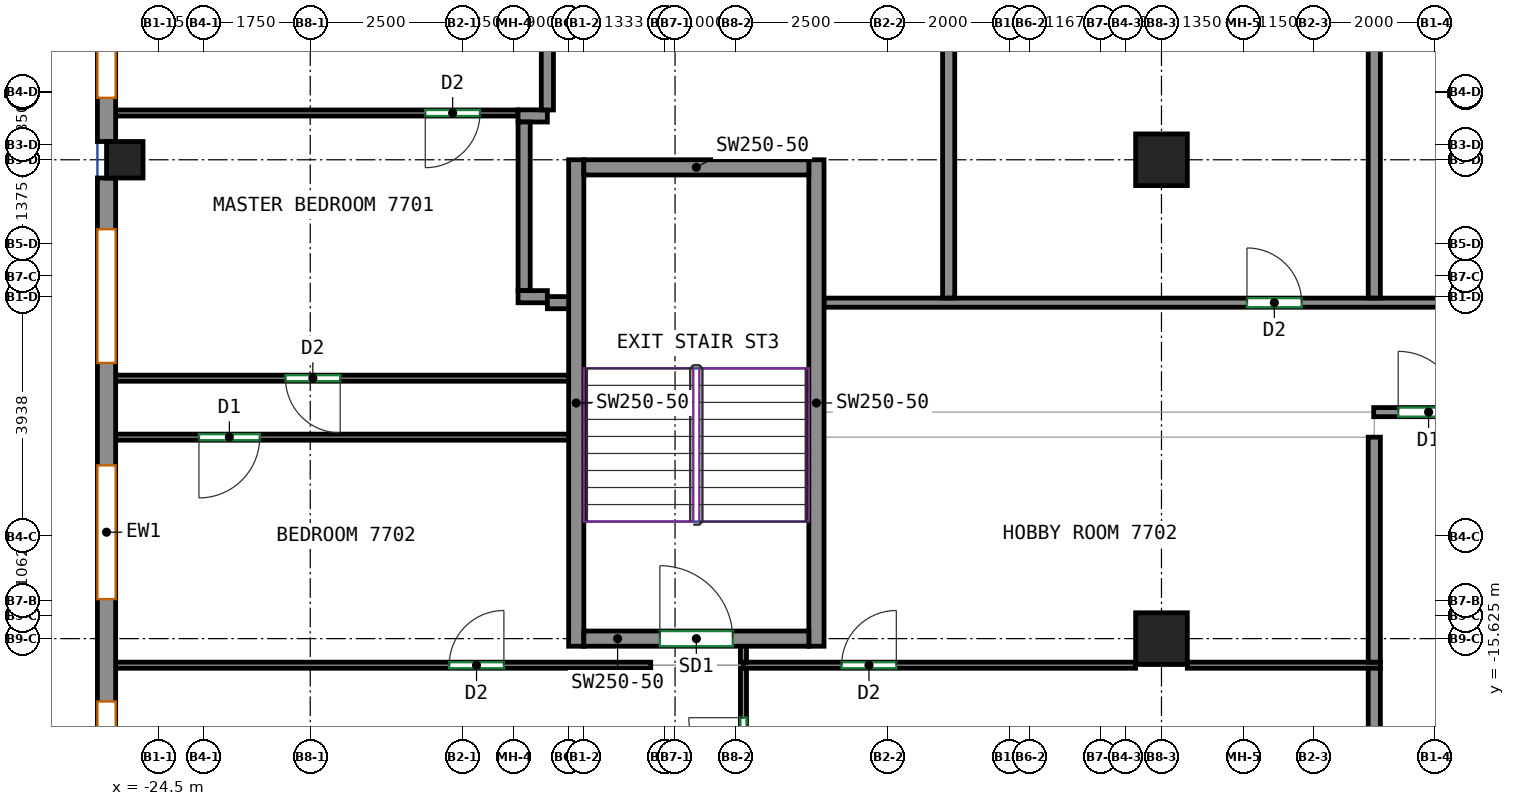
"""IFC4 building model, lengths in metres.
Left out: names, types, materials, properties, quantities, classifications, styles, units other than length and angle.
Written with IfcOpenShell. Run it as: python <this file> out.ifc"""

import sys

from ifc_helpers import new_model, si_unit, direction, frame, frame_2d, origin, origin_2d, place, context, subcontext, project, spatial, rectangle, extrude, source, transform, mapped, element, fill, save


model = new_model("IFC4")
c1 = context("Model", 3, precision=1e-05, world=origin(), true_north=direction((0.0, 1.0)))
c2 = subcontext(c1, "Body", "Model", "MODEL_VIEW")
j1 = project(units=[si_unit("LENGTHUNIT", "METRE"), si_unit("PLANEANGLEUNIT", "RADIAN")], contexts=[c1])
p1 = place(None, origin())
s1 = spatial("IfcSite", under=j1, at=p1, CompositionType="ELEMENT")
p2 = place(p1, origin())
s2 = spatial("IfcBuilding", under=s1, at=p2, CompositionType="ELEMENT")
p3 = place(p2, frame((0.0, 0.0, 308.6)))
s3 = spatial("IfcBuildingStorey", under=s2, at=p3, CompositionType="ELEMENT", Elevation=308.6)
m1 = source(origin(), c2, "Body", "SweptSolid", [
    extrude(rectangle(XDim=0.6, YDim=0.6, at=origin_2d()), origin(), (0.0, 0.0, 1.0), 3.12),
])
p4 = place(p3, frame((-25.05, -7.75, 0.0), z_axis=(0.0, 0.0, 1.0), x_axis=(1.0, 0.0, 0.0)))
e1 = element("IfcColumn", 1, at=p4, inside=s3, PredefinedType="COLUMN", context=c2, shape_type="MappedRepresentation", body=[
    mapped(m1, transform((0.0, 0.0, 0.0))),
])
m2 = source(origin(), c2, "Body", "SweptSolid", [
    extrude(rectangle(XDim=0.85, YDim=0.85, at=origin_2d()), origin(), (0.0, 0.0, 1.0), 3.12),
])
for number, where, z_axis, x_axis in (
    (2, (-8.0, -15.625, 0.0), (0.0, 0.0, 1.0), (1.0, 0.0, 0.0)),
    (3, (-8.0, -7.75, 0.0), (0.0, 0.0, 1.0), (1.0, 0.0, 0.0)),
):
    element("IfcColumn", number, at=place(p3, frame(where, z_axis=z_axis, x_axis=x_axis)), inside=s3, PredefinedType="COLUMN", context=c2, shape_type="MappedRepresentation", body=[
        mapped(m2, transform((0.0, 0.0, 0.0))),
    ])
m3 = source(origin(), c2, "Body", "SweptSolid", [
    extrude(rectangle(XDim=8.0, YDim=0.25, at=frame_2d((4.0, 0.0))), origin(), (0.0, 0.0, 1.0), 3.12),
])
for number, where, z_axis, x_axis in (
    (4, (-17.625, -15.75, 0.0), (0.0, 0.0, 1.0), (0.0, 1.0, 0.0)),
    (5, (-13.675, -15.75, 0.0), (0.0, 0.0, 1.0), (0.0, 1.0, 0.0)),
):
    element("IfcWall", number, at=place(p3, frame(where, z_axis=z_axis, x_axis=x_axis)), inside=s3, PredefinedType="SHEAR", context=c2, shape_type="MappedRepresentation", body=[
        mapped(m3, transform((0.0, 0.0, 0.0))),
    ])
m4 = source(origin(), c2, "Body", "SweptSolid", [
    extrude(rectangle(XDim=3.7, YDim=0.25, at=frame_2d((1.85, 0.0))), origin(), (0.0, 0.0, 1.0), 3.12),
])
p5 = place(p3, frame((-17.5, -15.625, 0.0), z_axis=(0.0, 0.0, 1.0), x_axis=(1.0, 0.0, 0.0)))
e6 = element("IfcWall", 6, at=p5, inside=s3, PredefinedType="SHEAR", context=c2, shape_type="MappedRepresentation", body=[
    mapped(m4, transform((0.0, 0.0, 0.0))),
])
p6 = place(p5, frame((1.25, 0.0, 0.0)))
e7 = element("IfcOpeningElement", 7, at=p6, cuts=e6, PredefinedType="OPENING", context=c2, shape_type="SweptSolid", body=[
    extrude(rectangle(XDim=1.2, YDim=2.1, at=frame_2d((0.6, 1.05))), frame((0.0, 0.135, 0.0), z_axis=(0.0, -1.0, 0.0), x_axis=(1.0, 0.0, 0.0)), (0.0, 0.0, 1.0), 0.27),
])
p7 = place(p3, frame((-17.5, -7.875, 0.0), z_axis=(0.0, 0.0, 1.0), x_axis=(1.0, 0.0, 0.0)))
e8 = element("IfcWall", 8, at=p7, inside=s3, PredefinedType="SHEAR", context=c2, shape_type="MappedRepresentation", body=[
    mapped(m4, transform((0.0, 0.0, 0.0))),
])
m5 = source(origin(), c2, "Body", "SweptSolid", [
    extrude(rectangle(XDim=7.275, YDim=0.3, at=frame_2d((3.637, 0.0))), origin(), (0.0, 0.0, 1.0), 3.12),
])
p8 = place(p3, frame((-25.35, -0.175, 0.0), z_axis=(0.0, 0.0, 1.0), x_axis=(0.0, -1.0, 0.0)))
e9 = element("IfcWall", 9, at=p8, inside=s3, PredefinedType="SOLIDWALL", context=c2, shape_type="MappedRepresentation", body=[
    mapped(m5, transform((0.0, 0.0, 0.0))),
])
p9 = place(p8, frame((0.719, 0.0, 0.8)))
e10 = element("IfcOpeningElement", 10, at=p9, cuts=e9, PredefinedType="OPENING", context=c2, shape_type="SweptSolid", body=[
    extrude(rectangle(XDim=2.2, YDim=2.05, at=frame_2d((1.1, 1.025))), frame((0.0, 0.16, 0.0), z_axis=(0.0, -1.0, 0.0), x_axis=(1.0, 0.0, 0.0)), (0.0, 0.0, 1.0), 0.32),
])
p10 = place(p8, frame((4.356, 0.0, 0.8)))
e11 = element("IfcOpeningElement", 11, at=p10, cuts=e9, PredefinedType="OPENING", context=c2, shape_type="SweptSolid", body=[
    extrude(rectangle(XDim=2.2, YDim=2.05, at=frame_2d((1.1, 1.025))), frame((0.0, 0.16, 0.0), z_axis=(0.0, -1.0, 0.0), x_axis=(1.0, 0.0, 0.0)), (0.0, 0.0, 1.0), 0.32),
])
m6 = source(origin(), c2, "Body", "SweptSolid", [
    extrude(rectangle(XDim=11.65, YDim=0.3, at=frame_2d((5.825, 0.0))), origin(), (0.0, 0.0, 1.0), 3.12),
])
p11 = place(p3, frame((-25.35, -8.05, 0.0), z_axis=(0.0, 0.0, 1.0), x_axis=(0.0, -1.0, 0.0)))
e12 = element("IfcWall", 12, at=p11, inside=s3, PredefinedType="SOLIDWALL", context=c2, shape_type="MappedRepresentation", body=[
    mapped(m6, transform((0.0, 0.0, 0.0))),
])
p12 = place(p11, frame((0.842, 0.0, 0.8)))
e13 = element("IfcOpeningElement", 13, at=p12, cuts=e12, PredefinedType="OPENING", context=c2, shape_type="SweptSolid", body=[
    extrude(rectangle(XDim=2.2, YDim=2.05, at=frame_2d((1.1, 1.025))), frame((0.0, 0.16, 0.0), z_axis=(0.0, -1.0, 0.0), x_axis=(1.0, 0.0, 0.0)), (0.0, 0.0, 1.0), 0.32),
])
p13 = place(p11, frame((4.725, 0.0, 0.8)))
e14 = element("IfcOpeningElement", 14, at=p13, cuts=e12, PredefinedType="OPENING", context=c2, shape_type="SweptSolid", body=[
    extrude(rectangle(XDim=2.2, YDim=2.05, at=frame_2d((1.1, 1.025))), frame((0.0, 0.16, 0.0), z_axis=(0.0, -1.0, 0.0), x_axis=(1.0, 0.0, 0.0)), (0.0, 0.0, 1.0), 0.32),
])
p14 = place(p11, frame((8.608, 0.0, 0.8)))
e15 = element("IfcOpeningElement", 15, at=p14, cuts=e12, PredefinedType="OPENING", context=c2, shape_type="SweptSolid", body=[
    extrude(rectangle(XDim=2.2, YDim=2.05, at=frame_2d((1.1, 1.025))), frame((0.0, 0.16, 0.0), z_axis=(0.0, -1.0, 0.0), x_axis=(1.0, 0.0, 0.0)), (0.0, 0.0, 1.0), 0.32),
])
p15 = place(p3, frame((-4.51, -11.9, 0.0), z_axis=(0.0, 0.0, 1.0), x_axis=(1.0, 0.0, 0.0)))
e16 = element("IfcWall", 16, at=p15, inside=s3, PredefinedType="PARTITIONING", context=c2, shape_type="SweptSolid", body=[
    extrude(rectangle(XDim=22.26, YDim=0.15, at=frame_2d((11.13, 0.0))), origin(), (0.0, 0.0, 1.0), 3.12),
])
p16 = place(p15, frame((0.403, 0.0, 0.0)))
e17 = element("IfcOpeningElement", 17, at=p16, cuts=e16, PredefinedType="OPENING", context=c2, shape_type="SweptSolid", body=[
    extrude(rectangle(XDim=1.0, YDim=2.1, at=frame_2d((0.5, 1.05))), frame((0.0, 0.085, 0.0), z_axis=(0.0, -1.0, 0.0), x_axis=(1.0, 0.0, 0.0)), (0.0, 0.0, 1.0), 0.17),
])
p17 = place(p3, frame((-13.55, -10.1, 0.0), z_axis=(0.0, 0.0, 1.0), x_axis=(1.0, 0.0, 0.0)))
e18 = element("IfcWall", 18, at=p17, inside=s3, PredefinedType="PARTITIONING", context=c2, shape_type="SweptSolid", body=[
    extrude(rectangle(XDim=30.65, YDim=0.15, at=frame_2d((15.325, 0.0))), origin(), (0.0, 0.0, 1.0), 3.12),
])
p18 = place(p17, frame((6.956, 0.0, 0.0)))
e19 = element("IfcOpeningElement", 19, at=p18, cuts=e18, PredefinedType="OPENING", context=c2, shape_type="SweptSolid", body=[
    extrude(rectangle(XDim=0.9, YDim=2.1, at=frame_2d((0.45, 1.05))), frame((0.0, 0.085, 0.0), z_axis=(0.0, -1.0, 0.0), x_axis=(1.0, 0.0, 0.0)), (0.0, 0.0, 1.0), 0.17),
])
p19 = place(p17, frame((10.643, 0.0, 0.0)))
e20 = element("IfcOpeningElement", 20, at=p19, cuts=e18, PredefinedType="OPENING", context=c2, shape_type="SweptSolid", body=[
    extrude(rectangle(XDim=0.9, YDim=2.1, at=frame_2d((0.45, 1.05))), frame((0.0, 0.085, 0.0), z_axis=(0.0, -1.0, 0.0), x_axis=(1.0, 0.0, 0.0)), (0.0, 0.0, 1.0), 0.17),
])
p20 = place(p17, frame((24.155, 0.0, 0.0)))
e21 = element("IfcOpeningElement", 21, at=p20, cuts=e18, PredefinedType="OPENING", context=c2, shape_type="SweptSolid", body=[
    extrude(rectangle(XDim=0.9, YDim=2.1, at=frame_2d((0.45, 1.05))), frame((0.0, 0.085, 0.0), z_axis=(0.0, -1.0, 0.0), x_axis=(1.0, 0.0, 0.0)), (0.0, 0.0, 1.0), 0.17),
])
p21 = place(p3, frame((-14.875, -19.762, 0.0), z_axis=(0.0, 0.0, 1.0), x_axis=(0.0, 1.0, 0.0)))
e22 = element("IfcWall", 22, at=p21, inside=s3, PredefinedType="PARTITIONING", context=c2, shape_type="SweptSolid", body=[
    extrude(rectangle(XDim=3.65, YDim=0.1, at=frame_2d((1.825, 0.0))), origin(), (0.0, 0.0, 1.0), 3.12),
])
p22 = place(p21, frame((1.937, 0.0, 0.0)))
e23 = element("IfcOpeningElement", 23, at=p22, cuts=e22, PredefinedType="OPENING", context=c2, shape_type="SweptSolid", body=[
    extrude(rectangle(XDim=0.9, YDim=2.1, at=frame_2d((0.45, 1.05))), frame((0.0, 0.06, 0.0), z_axis=(0.0, -1.0, 0.0), x_axis=(1.0, 0.0, 0.0)), (0.0, 0.0, 1.0), 0.12),
])
p23 = place(p3, frame((-25.25, -16.062, 0.0), z_axis=(0.0, 0.0, 1.0), x_axis=(1.0, 0.0, 0.0)))
e24 = element("IfcWall", 24, at=p23, inside=s3, PredefinedType="PARTITIONING", context=c2, shape_type="SweptSolid", body=[
    extrude(rectangle(XDim=8.85, YDim=0.1, at=frame_2d((4.425, 0.0))), origin(), (0.0, 0.0, 1.0), 3.12),
])
p24 = place(p23, frame((5.535, 0.0, 0.0)))
e25 = element("IfcOpeningElement", 25, at=p24, cuts=e24, PredefinedType="OPENING", context=c2, shape_type="SweptSolid", body=[
    extrude(rectangle(XDim=0.9, YDim=2.1, at=frame_2d((0.45, 1.05))), frame((0.0, 0.06, 0.0), z_axis=(0.0, -1.0, 0.0), x_axis=(1.0, 0.0, 0.0)), (0.0, 0.0, 1.0), 0.12),
])
p25 = place(p3, frame((-7.575, -16.062, 0.0), z_axis=(0.0, 0.0, 1.0), x_axis=(1.0, 0.0, 0.0)))
e26 = element("IfcWall", 26, at=p25, inside=s3, PredefinedType="PARTITIONING", context=c2, shape_type="SweptSolid", body=[
    extrude(rectangle(XDim=3.175, YDim=0.1, at=frame_2d((1.587, 0.0))), origin(), (0.0, 0.0, 1.0), 3.12),
])
p26 = place(p3, frame((-14.875, -16.062, 0.0), z_axis=(0.0, 0.0, 1.0), x_axis=(1.0, 0.0, 0.0)))
e27 = element("IfcWall", 27, at=p26, inside=s3, PredefinedType="PARTITIONING", context=c2, shape_type="SweptSolid", body=[
    extrude(rectangle(XDim=6.45, YDim=0.1, at=frame_2d((3.225, 0.0))), origin(), (0.0, 0.0, 1.0), 3.12),
])
p27 = place(p26, frame((1.614, 0.0, 0.0)))
e28 = element("IfcOpeningElement", 28, at=p27, cuts=e27, PredefinedType="OPENING", context=c2, shape_type="SweptSolid", body=[
    extrude(rectangle(XDim=0.9, YDim=2.1, at=frame_2d((0.45, 1.05))), frame((0.0, 0.06, 0.0), z_axis=(0.0, -1.0, 0.0), x_axis=(1.0, 0.0, 0.0)), (0.0, 0.0, 1.0), 0.12),
])
p28 = place(p3, frame((-4.5, -19.762, 0.0), z_axis=(0.0, 0.0, 1.0), x_axis=(0.0, 1.0, 0.0)))
e29 = element("IfcWall", 29, at=p28, inside=s3, PredefinedType="PARTITIONING", context=c2, shape_type="SweptSolid", body=[
    extrude(rectangle(XDim=3.65, YDim=0.2, at=frame_2d((1.825, 0.0))), origin(), (0.0, 0.0, 1.0), 3.12),
])
p29 = place(p3, frame((-14.875, -16.012, 0.0), z_axis=(0.0, 0.0, 1.0), x_axis=(0.0, 1.0, 0.0)))
e30 = element("IfcWall", 30, at=p29, inside=s3, PredefinedType="PARTITIONING", context=c2, shape_type="SweptSolid", body=[
    extrude(rectangle(XDim=0.312, YDim=0.1, at=frame_2d((0.156, 0.0))), origin(), (0.0, 0.0, 1.0), 3.12),
])
p30 = place(p3, frame((-17.75, -12.312, 0.0), z_axis=(0.0, 0.0, 1.0), x_axis=(-1.0, 0.0, 0.0)))
e31 = element("IfcWall", 31, at=p30, inside=s3, PredefinedType="PARTITIONING", context=c2, shape_type="SweptSolid", body=[
    extrude(rectangle(XDim=7.5, YDim=0.1, at=frame_2d((3.75, 0.0))), origin(), (0.0, 0.0, 1.0), 3.12),
])
p31 = place(p30, frame((5.08, 0.0, 0.0)))
e32 = element("IfcOpeningElement", 32, at=p31, cuts=e31, PredefinedType="OPENING", context=c2, shape_type="SweptSolid", body=[
    extrude(rectangle(XDim=1.0, YDim=2.1, at=frame_2d((0.5, 1.05))), frame((0.0, 0.06, 0.0), z_axis=(0.0, -1.0, 0.0), x_axis=(1.0, 0.0, 0.0)), (0.0, 0.0, 1.0), 0.12),
])
p32 = place(p3, frame((-4.5, -16.012, 0.0), z_axis=(0.0, 0.0, 1.0), x_axis=(0.0, 1.0, 0.0)))
e33 = element("IfcWall", 33, at=p32, inside=s3, PredefinedType="PARTITIONING", context=c2, shape_type="SweptSolid", body=[
    extrude(rectangle(XDim=3.7, YDim=0.2, at=frame_2d((1.85, 0.0))), origin(), (0.0, 0.0, 1.0), 3.12),
])
p33 = place(p3, frame((-17.75, -11.342, 0.0), z_axis=(0.0, 0.0, 1.0), x_axis=(-1.0, 0.0, 0.0)))
e34 = element("IfcWall", 34, at=p33, inside=s3, PredefinedType="PARTITIONING", context=c2, shape_type="SweptSolid", body=[
    extrude(rectangle(XDim=7.5, YDim=0.1, at=frame_2d((3.75, 0.0))), origin(), (0.0, 0.0, 1.0), 3.12),
])
p34 = place(p33, frame((3.757, 0.0, 0.0)))
e35 = element("IfcOpeningElement", 35, at=p34, cuts=e34, PredefinedType="OPENING", context=c2, shape_type="SweptSolid", body=[
    extrude(rectangle(XDim=0.9, YDim=2.1, at=frame_2d((0.45, 1.05))), frame((0.0, 0.06, 0.0), z_axis=(0.0, -1.0, 0.0), x_axis=(1.0, 0.0, 0.0)), (0.0, 0.0, 1.0), 0.12),
])
p35 = place(p3, frame((-18.582, -6.981, 0.0), z_axis=(0.0, 0.0, 1.0), x_axis=(-1.0, 0.0, 0.0)))
e36 = element("IfcWall", 36, at=p35, inside=s3, PredefinedType="PARTITIONING", context=c2, shape_type="SweptSolid", body=[
    extrude(rectangle(XDim=6.668, YDim=0.1, at=frame_2d((3.334, 0.0))), origin(), (0.0, 0.0, 1.0), 3.12),
])
p36 = place(p35, frame((0.626, 0.0, 0.0)))
e37 = element("IfcOpeningElement", 37, at=p36, cuts=e36, PredefinedType="OPENING", context=c2, shape_type="SweptSolid", body=[
    extrude(rectangle(XDim=0.9, YDim=2.1, at=frame_2d((0.45, 1.05))), frame((0.0, 0.06, 0.0), z_axis=(0.0, -1.0, 0.0), x_axis=(1.0, 0.0, 0.0)), (0.0, 0.0, 1.0), 0.12),
])
p37 = place(p3, frame((-18.582, -7.029, 0.0), z_axis=(0.0, 0.0, 1.0), x_axis=(1.0, 0.0, 0.0)))
e38 = element("IfcWall", 38, at=p37, inside=s3, PredefinedType="PARTITIONING", context=c2, shape_type="SweptSolid", body=[
    extrude(rectangle(XDim=0.482, YDim=0.2, at=frame_2d((0.241, 0.0))), origin(), (0.0, 0.0, 1.0), 3.12),
])
p38 = place(p3, frame((-18.482, -9.902, 0.0), z_axis=(0.0, 0.0, 1.0), x_axis=(0.0, 1.0, 0.0)))
e39 = element("IfcWall", 39, at=p38, inside=s3, PredefinedType="PARTITIONING", context=c2, shape_type="SweptSolid", body=[
    extrude(rectangle(XDim=2.773, YDim=0.2, at=frame_2d((1.387, 0.0))), origin(), (0.0, 0.0, 1.0), 3.12),
])
p39 = place(p3, frame((-18.1, -10.002, 0.0), z_axis=(0.0, 0.0, 1.0), x_axis=(-1.0, 0.0, 0.0)))
e40 = element("IfcWall", 40, at=p39, inside=s3, PredefinedType="PARTITIONING", context=c2, shape_type="SweptSolid", body=[
    extrude(rectangle(XDim=0.482, YDim=0.2, at=frame_2d((0.241, 0.0))), origin(), (0.0, 0.0, 1.0), 3.12),
])
p40 = place(p3, frame((-17.7, -10.1, 0.0), z_axis=(0.0, 0.0, 1.0), x_axis=(-1.0, 0.0, 0.0)))
e41 = element("IfcWall", 41, at=p40, inside=s3, PredefinedType="PARTITIONING", context=c2, shape_type="SweptSolid", body=[
    extrude(rectangle(XDim=0.4, YDim=0.2, at=frame_2d((0.2, 0.0))), origin(), (0.0, 0.0, 1.0), 3.12),
])
p41 = place(p3, frame((-18.1, -6.931, 0.0), z_axis=(0.0, 0.0, 1.0), x_axis=(0.0, 1.0, 0.0)))
e42 = element("IfcWall", 42, at=p41, inside=s3, PredefinedType="PARTITIONING", context=c2, shape_type="SweptSolid", body=[
    extrude(rectangle(XDim=7.693, YDim=0.2, at=frame_2d((3.846, 0.0))), origin(), (0.0, 0.0, 1.0), 3.12),
])
for number, where, z_axis, x_axis in (
    (43, (-11.5, -10.023, 0.0), (0.0, 0.0, 1.0), (0.0, 1.0, 0.0)),
    (44, (-4.5, -10.023, 0.0), (0.0, 0.0, 1.0), (0.0, 1.0, 0.0)),
):
    element("IfcWall", number, at=place(p3, frame(where, z_axis=z_axis, x_axis=x_axis)), inside=s3, PredefinedType="PARTITIONING", context=c2, shape_type="SweptSolid", body=[
        extrude(rectangle(XDim=6.111, YDim=0.2, at=frame_2d((3.055, 0.0))), origin(), (0.0, 0.0, 1.0), 3.12),
    ])
p42 = place(p10, origin())
e45 = element("IfcWindow", 45, at=p42, inside=s3, PartitioningType="SINGLE_PANEL", PredefinedType="WINDOW", context=c2, shape_type="SweptSolid", body=[
    extrude(rectangle(XDim=2.2, YDim=2.05, at=frame_2d((1.1, 1.025))), frame((0.0, 0.03, 0.0), z_axis=(0.0, -1.0, 0.0), x_axis=(1.0, 0.0, 0.0)), (0.0, 0.0, 1.0), 0.06),
])
fill(e11, e45)
p43 = place(p12, origin())
e46 = element("IfcWindow", 46, at=p43, inside=s3, PartitioningType="SINGLE_PANEL", PredefinedType="WINDOW", context=c2, shape_type="SweptSolid", body=[
    extrude(rectangle(XDim=2.2, YDim=2.05, at=frame_2d((1.1, 1.025))), frame((0.0, 0.03, 0.0), z_axis=(0.0, -1.0, 0.0), x_axis=(1.0, 0.0, 0.0)), (0.0, 0.0, 1.0), 0.06),
])
fill(e13, e46)
p44 = place(p13, origin())
e47 = element("IfcWindow", 47, at=p44, inside=s3, PartitioningType="SINGLE_PANEL", PredefinedType="WINDOW", context=c2, shape_type="SweptSolid", body=[
    extrude(rectangle(XDim=2.2, YDim=2.05, at=frame_2d((1.1, 1.025))), frame((0.0, 0.03, 0.0), z_axis=(0.0, -1.0, 0.0), x_axis=(1.0, 0.0, 0.0)), (0.0, 0.0, 1.0), 0.06),
])
fill(e14, e47)
p45 = place(p14, origin())
e48 = element("IfcWindow", 48, at=p45, inside=s3, PartitioningType="SINGLE_PANEL", PredefinedType="WINDOW", context=c2, shape_type="SweptSolid", body=[
    extrude(rectangle(XDim=2.2, YDim=2.05, at=frame_2d((1.1, 1.025))), frame((0.0, 0.03, 0.0), z_axis=(0.0, -1.0, 0.0), x_axis=(1.0, 0.0, 0.0)), (0.0, 0.0, 1.0), 0.06),
])
fill(e15, e48)
p46 = place(p6, origin())
e49 = element("IfcDoor", 49, at=p46, inside=s3, OperationType="DOUBLE_DOOR_SINGLE_SWING", PredefinedType="DOOR", context=c2, shape_type="SweptSolid", body=[
    extrude(rectangle(XDim=1.2, YDim=2.1, at=frame_2d((0.6, 1.05))), frame((0.0, 0.025, 0.0), z_axis=(0.0, -1.0, 0.0), x_axis=(1.0, 0.0, 0.0)), (0.0, 0.0, 1.0), 0.05),
])
fill(e7, e49)
p47 = place(p22, origin())
e50 = element("IfcDoor", 50, at=p47, inside=s3, OperationType="SINGLE_SWING_RIGHT", PredefinedType="DOOR", context=c2, shape_type="SweptSolid", body=[
    extrude(rectangle(XDim=0.9, YDim=2.1, at=frame_2d((0.45, 1.05))), frame((0.0, 0.025, 0.0), z_axis=(0.0, -1.0, 0.0), x_axis=(1.0, 0.0, 0.0)), (0.0, 0.0, 1.0), 0.05),
])
fill(e23, e50)
p48 = place(p24, origin())
e51 = element("IfcDoor", 51, at=p48, inside=s3, OperationType="SINGLE_SWING_RIGHT", PredefinedType="DOOR", context=c2, shape_type="SweptSolid", body=[
    extrude(rectangle(XDim=0.9, YDim=2.1, at=frame_2d((0.45, 1.05))), frame((0.0, 0.025, 0.0), z_axis=(0.0, -1.0, 0.0), x_axis=(1.0, 0.0, 0.0)), (0.0, 0.0, 1.0), 0.05),
])
fill(e25, e51)
p49 = place(p27, origin())
e52 = element("IfcDoor", 52, at=p49, inside=s3, OperationType="SINGLE_SWING_RIGHT", PredefinedType="DOOR", context=c2, shape_type="SweptSolid", body=[
    extrude(rectangle(XDim=0.9, YDim=2.1, at=frame_2d((0.45, 1.05))), frame((0.0, 0.025, 0.0), z_axis=(0.0, -1.0, 0.0), x_axis=(1.0, 0.0, 0.0)), (0.0, 0.0, 1.0), 0.05),
])
fill(e28, e52)
p50 = place(p31, origin())
e53 = element("IfcDoor", 53, at=p50, inside=s3, OperationType="SINGLE_SWING_RIGHT", PredefinedType="DOOR", context=c2, shape_type="SweptSolid", body=[
    extrude(rectangle(XDim=1.0, YDim=2.1, at=frame_2d((0.5, 1.05))), frame((0.0, 0.025, 0.0), z_axis=(0.0, -1.0, 0.0), x_axis=(1.0, 0.0, 0.0)), (0.0, 0.0, 1.0), 0.05),
])
fill(e32, e53)
p51 = place(p16, origin())
e54 = element("IfcDoor", 54, at=p51, inside=s3, OperationType="SINGLE_SWING_LEFT", PredefinedType="DOOR", context=c2, shape_type="SweptSolid", body=[
    extrude(rectangle(XDim=1.0, YDim=2.1, at=frame_2d((0.5, 1.05))), frame((0.0, 0.025, 0.0), z_axis=(0.0, -1.0, 0.0), x_axis=(1.0, 0.0, 0.0)), (0.0, 0.0, 1.0), 0.05),
])
fill(e17, e54)
p52 = place(p34, origin())
e55 = element("IfcDoor", 55, at=p52, inside=s3, OperationType="SINGLE_SWING_LEFT", PredefinedType="DOOR", context=c2, shape_type="SweptSolid", body=[
    extrude(rectangle(XDim=0.9, YDim=2.1, at=frame_2d((0.45, 1.05))), frame((0.0, 0.025, 0.0), z_axis=(0.0, -1.0, 0.0), x_axis=(1.0, 0.0, 0.0)), (0.0, 0.0, 1.0), 0.05),
])
fill(e35, e55)
p53 = place(p18, origin())
e56 = element("IfcDoor", 56, at=p53, inside=s3, OperationType="SINGLE_SWING_LEFT", PredefinedType="DOOR", context=c2, shape_type="SweptSolid", body=[
    extrude(rectangle(XDim=0.9, YDim=2.1, at=frame_2d((0.45, 1.05))), frame((0.0, 0.025, 0.0), z_axis=(0.0, -1.0, 0.0), x_axis=(1.0, 0.0, 0.0)), (0.0, 0.0, 1.0), 0.05),
])
fill(e19, e56)
p54 = place(p36, origin())
e57 = element("IfcDoor", 57, at=p54, inside=s3, OperationType="SINGLE_SWING_RIGHT", PredefinedType="DOOR", context=c2, shape_type="SweptSolid", body=[
    extrude(rectangle(XDim=0.9, YDim=2.1, at=frame_2d((0.45, 1.05))), frame((0.0, 0.025, 0.0), z_axis=(0.0, -1.0, 0.0), x_axis=(1.0, 0.0, 0.0)), (0.0, 0.0, 1.0), 0.05),
])
fill(e37, e57)
save(model, sys.argv[1])
